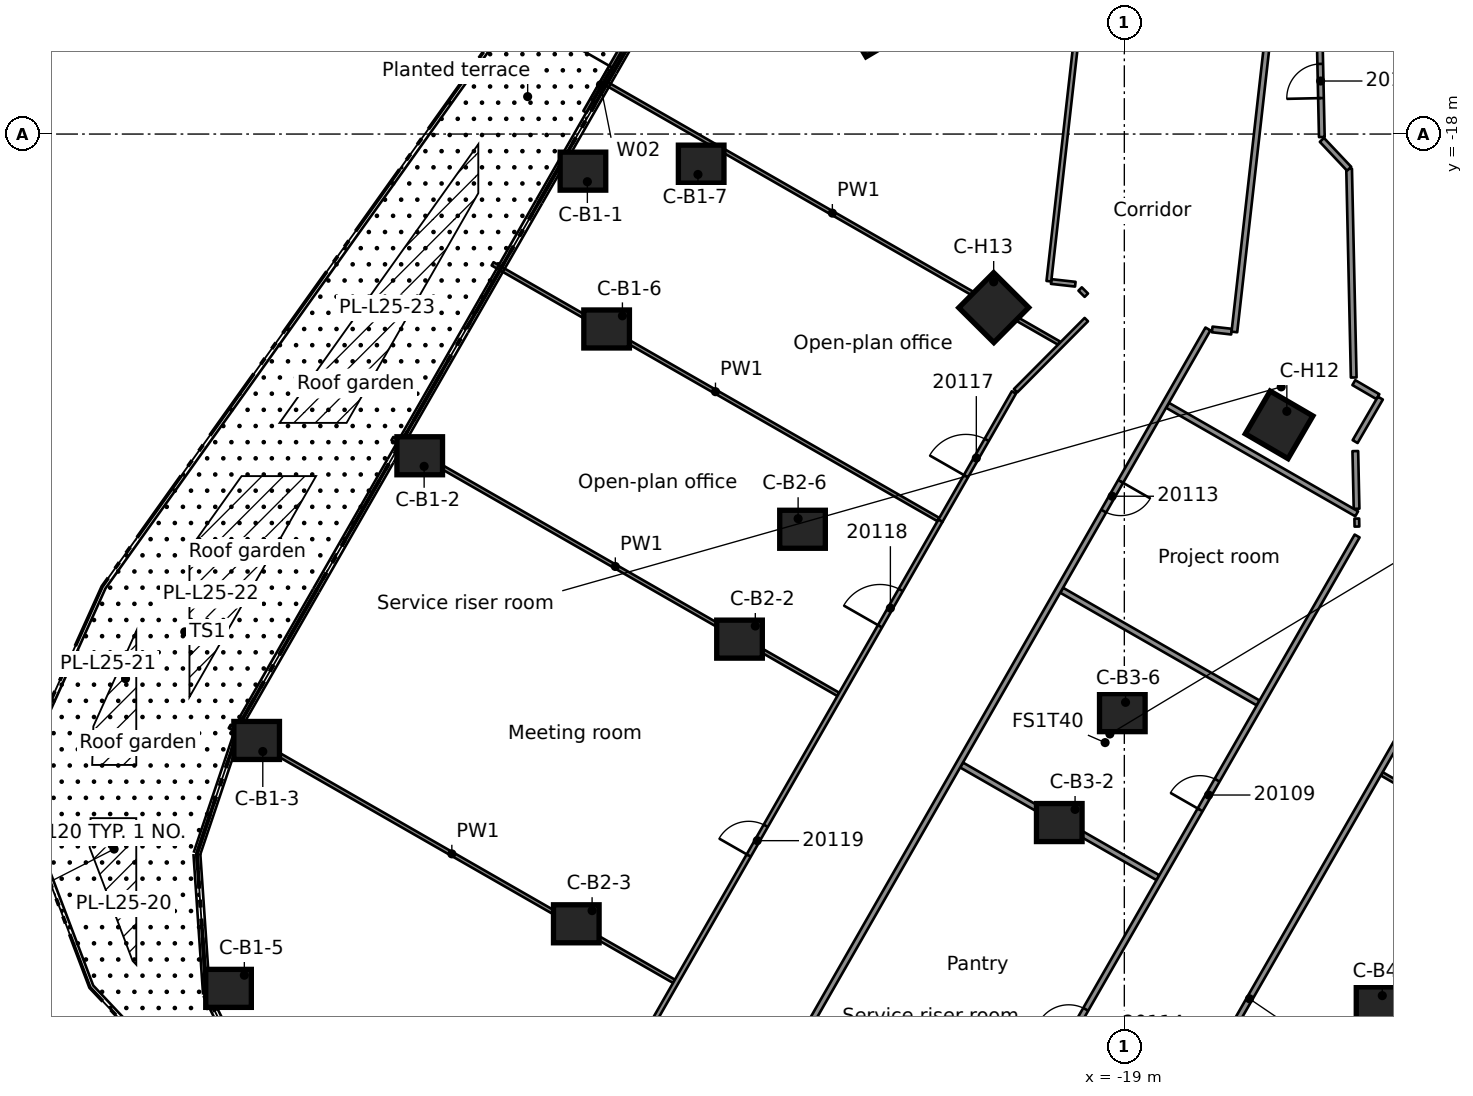
"""IFC4 building model, lengths in metres.
Left out: names, types, materials, properties, quantities, classifications, styles, units other than length and angle.
Written with IfcOpenShell. Run it as: python <this file> out.ifc"""

import sys

from ifc_helpers import new_model, si_unit, direction, frame, frame_2d, origin, origin_2d, place, context, subcontext, project, spatial, rectangle, extrude, element, fill, save


model = new_model("IFC4")
c1 = context("Model", 3, precision=1e-05, world=origin(), true_north=direction((0.0, 1.0)))
c2 = subcontext(c1, "Body", "Model", "MODEL_VIEW")
j1 = project(units=[si_unit("LENGTHUNIT", "METRE"), si_unit("PLANEANGLEUNIT", "RADIAN")], contexts=[c1])
p1 = place(None, origin())
s1 = spatial("IfcSite", under=j1, at=p1, CompositionType="ELEMENT")
p2 = place(p1, origin())
s2 = spatial("IfcBuilding", under=s1, at=p2, CompositionType="ELEMENT")
p3 = place(p2, frame((0.0, 0.0, 102.2)))
s3 = spatial("IfcBuildingStorey", under=s2, at=p3, CompositionType="ELEMENT", Elevation=102.2)
for number, where, z_axis, x_axis in (
    (1, (-33.246, -18.976, 0.0), (0.0, 0.0, 1.0), (1.0, 0.0, 0.0)),
    (2, (-37.541, -26.465, 0.0), (0.0, 0.0, 1.0), (1.0, 0.0, 0.0)),
    (3, (-41.832, -33.956, 0.0), (0.0, 0.0, 1.0), (1.0, 0.0, 0.0)),
    (4, (-42.572, -40.479, 0.0), (0.0, 0.0, 1.0), (1.0, 0.0, 0.0)),
    (5, (-32.623, -23.129, 0.0), (0.0, 0.0, 1.0), (1.0, 0.0, 0.0)),
    (6, (-30.135, -18.792, 0.0), (0.0, 0.0, 1.0), (1.0, 0.0, 0.0)),
    (7, (-29.126, -31.29, 0.0), (0.0, 0.0, 1.0), (1.0, 0.0, 0.0)),
    (8, (-33.421, -38.78, 0.0), (0.0, 0.0, 1.0), (1.0, 0.0, 0.0)),
    (9, (-27.468, -28.399, 0.0), (0.0, 0.0, 1.0), (1.0, 0.0, 0.0)),
    (10, (-20.712, -36.116, 0.0), (0.0, 0.0, 1.0), (1.0, 0.0, 0.0)),
    (11, (-19.053, -33.224, 0.0), (0.0, 0.0, 1.0), (1.0, 0.0, 0.0)),
    (12, (-12.297, -40.941, 0.0), (0.0, 0.0, 1.0), (1.0, 0.0, 0.0)),
):
    element("IfcColumn", number, at=place(p3, frame(where, z_axis=z_axis, x_axis=x_axis)), inside=s3, PredefinedType="COLUMN", context=c2, shape_type="SweptSolid", body=[
        extrude(rectangle(XDim=1.2, YDim=1.0, at=origin_2d()), origin(), (0.0, 0.0, 1.0), 3.5),
    ])
for number, where, z_axis, x_axis in (
    (13, (-14.927, -25.652, 0.0), (0.0, 0.0, 1.0), (-0.503, -0.864, 0.0)),
    (14, (-22.436, -22.567, 0.0), (0.0, 0.0, 1.0), (-0.705, -0.709, 0.0)),
    (15, (-25.565, -15.076, 0.0), (0.0, 0.0, 1.0), (-0.861, -0.508, 0.0)),
):
    element("IfcColumn", number, at=place(p3, frame(where, z_axis=z_axis, x_axis=x_axis)), inside=s3, PredefinedType="COLUMN", context=c2, shape_type="SweptSolid", body=[
        extrude(rectangle(XDim=1.3, YDim=1.3, at=origin_2d()), origin(), (0.0, 0.0, 1.0), 3.5),
    ])
p4 = place(p3, frame((-33.193, -17.416, 0.0), z_axis=(0.0, 0.0, 1.0), x_axis=(0.497482354019, 0.86747409612, 0.0)))
e16 = element("IfcWall", 16, at=p4, inside=s3, PredefinedType="STANDARD", context=c2, shape_type="SweptSolid", body=[
    extrude(rectangle(XDim=4.539, YDim=0.1, at=frame_2d((2.269, 0.0))), origin(), (0.0, 0.0, 1.0), 3.1),
])
p5 = place(p4, frame((1.369, 0.0, 0.0)))
e17 = element("IfcOpeningElement", 17, at=p5, cuts=e16, PredefinedType="OPENING", context=c2, shape_type="SweptSolid", body=[
    extrude(rectangle(XDim=1.8, YDim=2.4, at=frame_2d((0.9, 1.2))), frame((0.0, 0.06, 0.0), z_axis=(0.0, -1.0, 0.0), x_axis=(1.0, 0.0, 0.0)), (0.0, 0.0, 1.0), 0.12),
])
p6 = place(p4, frame((0.369, 0.0, 0.0)))
e18 = element("IfcOpeningElement", 18, at=p6, cuts=e16, PredefinedType="OPENING", context=c2, shape_type="SweptSolid", body=[
    extrude(rectangle(XDim=0.9, YDim=2.4, at=frame_2d((0.45, 1.2))), frame((0.0, 0.06, 0.0), z_axis=(0.0, -1.0, 0.0), x_axis=(1.0, 0.0, 0.0)), (0.0, 0.0, 1.0), 0.12),
])
p7 = place(p4, frame((3.269, 0.0, 0.0)))
e19 = element("IfcOpeningElement", 19, at=p7, cuts=e16, PredefinedType="OPENING", context=c2, shape_type="SweptSolid", body=[
    extrude(rectangle(XDim=0.9, YDim=2.4, at=frame_2d((0.45, 1.2))), frame((0.0, 0.06, 0.0), z_axis=(0.0, -1.0, 0.0), x_axis=(1.0, 0.0, 0.0)), (0.0, 0.0, 1.0), 0.12),
])
p8 = place(p3, frame((-12.922, -26.342, 0.0), z_axis=(0.0, 0.0, 1.0), x_axis=(0.021884343994, -0.999760509066, 0.0)))
e20 = element("IfcWall", 20, at=p8, inside=s3, PredefinedType="PARTITIONING", context=c2, shape_type="SweptSolid", body=[
    extrude(rectangle(XDim=1.517, YDim=0.15, at=frame_2d((0.759, 0.0))), origin(), (0.0, 0.0, 1.0), 3.08),
])
p9 = place(p3, frame((-13.803, -18.079, 0.0), z_axis=(0.0, 0.0, 1.0), x_axis=(-0.021654973705, 0.999765503563, 0.0)))
e21 = element("IfcWall", 21, at=p9, inside=s3, PredefinedType="PARTITIONING", context=c2, shape_type="SweptSolid", body=[
    extrude(rectangle(XDim=2.954, YDim=0.15, at=frame_2d((1.477, 0.0))), origin(), (0.0, 0.0, 1.0), 3.08),
])
p10 = place(p9, frame((1.025, 0.0, 0.0)))
e22 = element("IfcOpeningElement", 22, at=p10, cuts=e21, PredefinedType="OPENING", context=c2, shape_type="SweptSolid", body=[
    extrude(rectangle(XDim=0.9, YDim=2.1, at=frame_2d((0.45, 1.05))), frame((0.0, 0.085, 0.0), z_axis=(0.0, -1.0, 0.0), x_axis=(1.0, 0.0, 0.0)), (0.0, 0.0, 1.0), 0.17),
])
p11 = place(p3, frame((-13.085, -18.913, 0.0), z_axis=(0.0, 0.0, 1.0), x_axis=(0.021995655044, -0.999758066314, 0.0)))
e23 = element("IfcWall", 23, at=p11, inside=s3, PredefinedType="PARTITIONING", context=c2, shape_type="SweptSolid", body=[
    extrude(rectangle(XDim=5.494, YDim=0.15, at=frame_2d((2.747, 0.0))), origin(), (0.0, 0.0, 1.0), 3.08),
])
p12 = place(p3, frame((-12.883, -28.117, 0.0), z_axis=(0.0, 0.0, 1.0), x_axis=(0.019672118342, -0.999806485156, 0.0)))
e24 = element("IfcWall", 24, at=p12, inside=s3, PredefinedType="PARTITIONING", context=c2, shape_type="SweptSolid", body=[
    extrude(rectangle(XDim=0.211, YDim=0.125, at=frame_2d((0.105, 0.0))), origin(), (0.0, 0.0, 1.0), 3.08),
])
p13 = place(p3, frame((-20.163, -22.077, 0.0), z_axis=(0.0, 0.0, 1.0), x_axis=(0.707106781187, -0.707106781187, 0.0)))
e25 = element("IfcWall", 25, at=p13, inside=s3, PredefinedType="PARTITIONING", context=c2, shape_type="SweptSolid", body=[
    extrude(rectangle(XDim=0.231, YDim=0.125, at=frame_2d((0.115, 0.0))), origin(), (0.0, 0.0, 1.0), 3.08),
])
p14 = place(p3, frame((-12.961, -24.54, 0.0), z_axis=(0.0, 0.0, 1.0), x_axis=(0.863766837374, -0.503891705283, 0.0)))
e26 = element("IfcWall", 26, at=p14, inside=s3, PredefinedType="PARTITIONING", context=c2, shape_type="SweptSolid", body=[
    extrude(rectangle(XDim=0.734, YDim=0.15, at=frame_2d((0.367, 0.0))), origin(), (0.0, 0.0, 1.0), 3.08),
])
p15 = place(p3, frame((-42.542, -33.587, 0.0), z_axis=(0.0, 0.0, 1.0), x_axis=(0.867443920759, -0.497534967956, 0.0)))
e27 = element("IfcWall", 27, at=p15, inside=s3, PredefinedType="PARTITIONING", context=c2, shape_type="SweptSolid", body=[
    extrude(rectangle(XDim=13.479, YDim=0.1, at=frame_2d((6.739, 0.0))), origin(), (0.0, 0.0, 1.0), 3.08),
])
p16 = place(p3, frame((-38.261, -26.013, 0.0), z_axis=(0.0, 0.0, 1.0), x_axis=(0.867449007851, -0.49752609859, 0.0)))
e28 = element("IfcWall", 28, at=p16, inside=s3, PredefinedType="PARTITIONING", context=c2, shape_type="SweptSolid", body=[
    extrude(rectangle(XDim=13.527, YDim=0.1, at=frame_2d((6.763, 0.0))), origin(), (0.0, 0.0, 1.0), 3.08),
])
p17 = place(p3, frame((-23.283, -34.602, 0.0), z_axis=(0.0, 0.0, 1.0), x_axis=(0.867394604178, -0.497620940719, 0.0)))
e29 = element("IfcWall", 29, at=p17, inside=s3, PredefinedType="PARTITIONING", context=c2, shape_type="SweptSolid", body=[
    extrude(rectangle(XDim=5.958, YDim=0.15, at=frame_2d((2.979, 0.0))), origin(), (0.0, 0.0, 1.0), 3.08),
])
p18 = place(p3, frame((-35.624, -21.415, 0.0), z_axis=(0.0, 0.0, 1.0), x_axis=(0.867457713736, -0.497510919358, 0.0)))
e30 = element("IfcWall", 30, at=p18, inside=s3, PredefinedType="PARTITIONING", context=c2, shape_type="SweptSolid", body=[
    extrude(rectangle(XDim=13.523, YDim=0.1, at=frame_2d((6.762, 0.0))), origin(), (0.0, 0.0, 1.0), 3.08),
])
p19 = place(p3, frame((-20.65, -30.003, 0.0), z_axis=(0.0, 0.0, 1.0), x_axis=(0.867468461176, -0.497492179703, 0.0)))
e31 = element("IfcWall", 31, at=p19, inside=s3, PredefinedType="PARTITIONING", context=c2, shape_type="SweptSolid", body=[
    extrude(rectangle(XDim=5.962, YDim=0.15, at=frame_2d((2.981, 0.0))), origin(), (0.0, 0.0, 1.0), 3.08),
])
p20 = place(p3, frame((-12.225, -34.835, 0.0), z_axis=(0.0, 0.0, 1.0), x_axis=(0.867497921586, -0.497440806573, 0.0)))
e32 = element("IfcWall", 32, at=p20, inside=s3, PredefinedType="PARTITIONING", context=c2, shape_type="SweptSolid", body=[
    extrude(rectangle(XDim=13.525, YDim=0.1, at=frame_2d((6.763, 0.0))), origin(), (0.0, 0.0, 1.0), 3.08),
])
p21 = place(p3, frame((-32.645, -16.662, 0.0), z_axis=(0.0, 0.0, 1.0), x_axis=(0.867516428304, -0.497408530911, 0.0)))
e33 = element("IfcWall", 33, at=p21, inside=s3, PredefinedType="PARTITIONING", context=c2, shape_type="SweptSolid", body=[
    extrude(rectangle(XDim=13.745, YDim=0.1, at=frame_2d((6.873, 0.0))), origin(), (0.0, 0.0, 1.0), 3.08),
])
p22 = place(p3, frame((-17.864, -25.137, 0.0), z_axis=(0.0, 0.0, 1.0), x_axis=(0.867461886369, -0.497503643904, 0.0)))
e34 = element("IfcWall", 34, at=p22, inside=s3, PredefinedType="PARTITIONING", context=c2, shape_type="SweptSolid", body=[
    extrude(rectangle(XDim=5.739, YDim=0.15, at=frame_2d((2.869, 0.0))), origin(), (0.0, 0.0, 1.0), 3.08),
])
p23 = place(p3, frame((-16.687, -23.141, 0.0), z_axis=(0.0, 0.0, 1.0), x_axis=(0.993552701249, -0.113371203754, 0.0)))
e35 = element("IfcWall", 35, at=p23, inside=s3, PredefinedType="PARTITIONING", context=c2, shape_type="SweptSolid", body=[
    extrude(rectangle(XDim=0.51, YDim=0.15, at=frame_2d((0.255, 0.0))), origin(), (0.0, 0.0, 1.0), 3.08),
])
p24 = place(p3, frame((-20.924, -21.88, 0.0), z_axis=(0.0, 0.0, 1.0), x_axis=(0.993780638981, -0.111355473987, 0.0)))
e36 = element("IfcWall", 36, at=p24, inside=s3, PredefinedType="PARTITIONING", context=c2, shape_type="SweptSolid", body=[
    extrude(rectangle(XDim=0.638, YDim=0.125, at=frame_2d((0.319, 0.0))), origin(), (0.0, 0.0, 1.0), 3.08),
])
p25 = place(p3, frame((-13.801, -18.154, 0.0), z_axis=(0.0, 0.0, 1.0), x_axis=(0.686218091213, -0.727395855977, 0.0)))
e37 = element("IfcWall", 37, at=p25, inside=s3, PredefinedType="PARTITIONING", context=c2, shape_type="SweptSolid", body=[
    extrude(rectangle(XDim=1.043, YDim=0.15, at=frame_2d((0.522, 0.0))), origin(), (0.0, 0.0, 1.0), 3.08),
])
p26 = place(p3, frame((-20.0, -22.882, 0.0), z_axis=(0.0, 0.0, 1.0), x_axis=(-0.705070089301, -0.709137623578, 0.0)))
e38 = element("IfcWall", 38, at=p26, inside=s3, PredefinedType="PARTITIONING", context=c2, shape_type="SweptSolid", body=[
    extrude(rectangle(XDim=2.641, YDim=0.125, at=frame_2d((1.32, 0.0))), origin(), (0.0, 0.0, 1.0), 3.08),
])
p27 = place(p3, frame((-12.927, -26.092, 0.0), z_axis=(0.0, 0.0, 1.0), x_axis=(0.502562736504, 0.864540742752, 0.0)))
e39 = element("IfcWall", 39, at=p27, inside=s3, PredefinedType="PARTITIONING", context=c2, shape_type="SweptSolid", body=[
    extrude(rectangle(XDim=1.323, YDim=0.15, at=frame_2d((0.662, 0.0))), origin(), (0.0, 0.0, 1.0), 3.08),
])
p28 = place(p3, frame((-9.673, -30.229, 0.0), z_axis=(0.0, 0.0, 1.0), x_axis=(-0.497332712809, -0.867559895783, 0.0)))
e40 = element("IfcWall", 40, at=p28, inside=s3, PredefinedType="PARTITIONING", context=c2, shape_type="SweptSolid", body=[
    extrude(rectangle(XDim=24.261, YDim=0.15, at=frame_2d((12.131, 0.0))), origin(), (0.0, 0.0, 1.0), 3.08),
])
p29 = place(p28, frame((1.288, 0.0, 0.0)))
e41 = element("IfcOpeningElement", 41, at=p29, cuts=e40, PredefinedType="OPENING", context=c2, shape_type="SweptSolid", body=[
    extrude(rectangle(XDim=1.1, YDim=2.1, at=frame_2d((0.55, 1.05))), frame((0.0, 0.085, 0.0), z_axis=(0.0, -1.0, 0.0), x_axis=(1.0, 0.0, 0.0)), (0.0, 0.0, 1.0), 0.17),
])
p30 = place(p28, frame((14.415, 0.0, 0.0)))
e42 = element("IfcOpeningElement", 42, at=p30, cuts=e40, PredefinedType="OPENING", context=c2, shape_type="SweptSolid", body=[
    extrude(rectangle(XDim=0.9, YDim=2.1, at=frame_2d((0.45, 1.05))), frame((0.0, 0.085, 0.0), z_axis=(0.0, -1.0, 0.0), x_axis=(1.0, 0.0, 0.0)), (0.0, 0.0, 1.0), 0.17),
])
p31 = place(p3, frame((-23.323, -46.799, 0.0), z_axis=(0.0, 0.0, 1.0), x_axis=(0.497421315986, 0.867509097591, 0.0)))
e43 = element("IfcWall", 43, at=p31, inside=s3, PredefinedType="PARTITIONING", context=c2, shape_type="SweptSolid", body=[
    extrude(rectangle(XDim=21.006, YDim=0.15, at=frame_2d((10.503, 0.0))), origin(), (0.0, 0.0, 1.0), 3.08),
])
p32 = place(p31, frame((12.7, 0.0, 0.0)))
e44 = element("IfcOpeningElement", 44, at=p32, cuts=e43, PredefinedType="OPENING", context=c2, shape_type="SweptSolid", body=[
    extrude(rectangle(XDim=0.9, YDim=2.1, at=frame_2d((0.45, 1.05))), frame((0.0, 0.085, 0.0), z_axis=(0.0, -1.0, 0.0), x_axis=(1.0, 0.0, 0.0)), (0.0, 0.0, 1.0), 0.17),
])
p33 = place(p31, frame((5.75, 0.0, 0.0)))
e45 = element("IfcOpeningElement", 45, at=p33, cuts=e43, PredefinedType="OPENING", context=c2, shape_type="SweptSolid", body=[
    extrude(rectangle(XDim=0.9, YDim=2.1, at=frame_2d((0.45, 1.05))), frame((0.0, 0.085, 0.0), z_axis=(0.0, -1.0, 0.0), x_axis=(1.0, 0.0, 0.0)), (0.0, 0.0, 1.0), 0.17),
])
p34 = place(p3, frame((-16.8, -23.128, 0.0), z_axis=(0.0, 0.0, 1.0), x_axis=(-0.496846554385, -0.867838407422, 0.0)))
e46 = element("IfcWall", 46, at=p34, inside=s3, PredefinedType="PARTITIONING", context=c2, shape_type="SweptSolid", body=[
    extrude(rectangle(XDim=21.88, YDim=0.15, at=frame_2d((10.94, 0.0))), origin(), (0.0, 0.0, 1.0), 3.08),
])
p35 = place(p34, frame((4.622, 0.0, 0.0)))
e47 = element("IfcOpeningElement", 47, at=p35, cuts=e46, PredefinedType="OPENING", context=c2, shape_type="SweptSolid", body=[
    extrude(rectangle(XDim=0.9, YDim=2.1, at=frame_2d((0.45, 1.05))), frame((0.0, 0.085, 0.0), z_axis=(0.0, -1.0, 0.0), x_axis=(1.0, 0.0, 0.0)), (0.0, 0.0, 1.0), 0.17),
])
p36 = place(p3, frame((-23.839, -28.174, 0.0), z_axis=(0.0, 0.0, 1.0), x_axis=(0.49701747238, 0.867740532734, 0.0)))
e48 = element("IfcWall", 48, at=p36, inside=s3, PredefinedType="PARTITIONING", context=c2, shape_type="SweptSolid", body=[
    extrude(rectangle(XDim=3.889, YDim=0.125, at=frame_2d((1.945, 0.0))), origin(), (0.0, 0.0, 1.0), 3.08),
])
p37 = place(p36, frame((1.35, 0.0, 0.0)))
e49 = element("IfcOpeningElement", 49, at=p37, cuts=e48, PredefinedType="OPENING", context=c2, shape_type="SweptSolid", body=[
    extrude(rectangle(XDim=1.1, YDim=2.1, at=frame_2d((0.55, 1.05))), frame((0.0, 0.073, 0.0), z_axis=(0.0, -1.0, 0.0), x_axis=(1.0, 0.0, 0.0)), (0.0, 0.0, 1.0), 0.145),
])
p38 = place(p3, frame((-33.38, -44.837, 0.0), z_axis=(0.0, 0.0, 1.0), x_axis=(0.496890503853, 0.867813244414, 0.0)))
e50 = element("IfcWall", 50, at=p38, inside=s3, PredefinedType="PARTITIONING", context=c2, shape_type="SweptSolid", body=[
    extrude(rectangle(XDim=19.201, YDim=0.125, at=frame_2d((9.601, 0.0))), origin(), (0.0, 0.0, 1.0), 3.08),
])
p39 = place(p38, frame((16.0, 0.0, 0.0)))
e51 = element("IfcOpeningElement", 51, at=p39, cuts=e50, PredefinedType="OPENING", context=c2, shape_type="SweptSolid", body=[
    extrude(rectangle(XDim=1.1, YDim=2.1, at=frame_2d((0.55, 1.05))), frame((0.0, 0.073, 0.0), z_axis=(0.0, -1.0, 0.0), x_axis=(1.0, 0.0, 0.0)), (0.0, 0.0, 1.0), 0.145),
])
p40 = place(p38, frame((9.05, 0.0, 0.0)))
e52 = element("IfcOpeningElement", 52, at=p40, cuts=e50, PredefinedType="OPENING", context=c2, shape_type="SweptSolid", body=[
    extrude(rectangle(XDim=0.9, YDim=2.1, at=frame_2d((0.45, 1.05))), frame((0.0, 0.073, 0.0), z_axis=(0.0, -1.0, 0.0), x_axis=(1.0, 0.0, 0.0)), (0.0, 0.0, 1.0), 0.145),
])
p41 = place(p3, frame((-16.104, -23.207, 0.0), z_axis=(0.0, 0.0, 1.0), x_axis=(0.112384250222, 0.993664822917, 0.0)))
e53 = element("IfcWall", 53, at=p41, inside=s3, PredefinedType="PARTITIONING", context=c2, shape_type="SweptSolid", body=[
    extrude(rectangle(XDim=8.205, YDim=0.15, at=frame_2d((4.103, 0.0))), origin(), (0.0, 0.0, 1.0), 3.08),
])
p42 = place(p3, frame((-20.986, -21.872, 0.0), z_axis=(0.0, 0.0, 1.0), x_axis=(0.112457212795, 0.993656568081, 0.0)))
e54 = element("IfcWall", 54, at=p42, inside=s3, PredefinedType="PARTITIONING", context=c2, shape_type="SweptSolid", body=[
    extrude(rectangle(XDim=6.865, YDim=0.125, at=frame_2d((3.432, 0.0))), origin(), (0.0, 0.0, 1.0), 3.08),
])
p43 = place(p5, origin())
e55 = element("IfcDoor", 55, at=p43, inside=s3, OperationType="DOUBLE_DOOR_SINGLE_SWING", PredefinedType="DOOR", context=c2, shape_type="SweptSolid", body=[
    extrude(rectangle(XDim=1.8, YDim=2.4, at=frame_2d((0.9, 1.2))), frame((0.0, 0.025, 0.0), z_axis=(0.0, -1.0, 0.0), x_axis=(1.0, 0.0, 0.0)), (0.0, 0.0, 1.0), 0.05),
])
fill(e17, e55)
p44 = place(p6, origin())
e56 = element("IfcWindow", 56, at=p44, inside=s3, PartitioningType="SINGLE_PANEL", PredefinedType="WINDOW", context=c2, shape_type="SweptSolid", body=[
    extrude(rectangle(XDim=0.9, YDim=2.4, at=frame_2d((0.45, 1.2))), frame((0.0, 0.03, 0.0), z_axis=(0.0, -1.0, 0.0), x_axis=(1.0, 0.0, 0.0)), (0.0, 0.0, 1.0), 0.06),
])
fill(e18, e56)
p45 = place(p32, origin())
e57 = element("IfcDoor", 57, at=p45, inside=s3, OperationType="SINGLE_SWING_RIGHT", PredefinedType="DOOR", context=c2, shape_type="SweptSolid", body=[
    extrude(rectangle(XDim=0.9, YDim=2.1, at=frame_2d((0.45, 1.05))), frame((0.0, 0.025, 0.0), z_axis=(0.0, -1.0, 0.0), x_axis=(1.0, 0.0, 0.0)), (0.0, 0.0, 1.0), 0.05),
])
fill(e44, e57)
p46 = place(p35, origin())
e58 = element("IfcDoor", 58, at=p46, inside=s3, OperationType="SINGLE_SWING_LEFT", PredefinedType="DOOR", context=c2, shape_type="SweptSolid", body=[
    extrude(rectangle(XDim=0.9, YDim=2.1, at=frame_2d((0.45, 1.05))), frame((0.0, 0.025, 0.0), z_axis=(0.0, -1.0, 0.0), x_axis=(1.0, 0.0, 0.0)), (0.0, 0.0, 1.0), 0.05),
])
fill(e47, e58)
p47 = place(p33, origin())
e59 = element("IfcDoor", 59, at=p47, inside=s3, OperationType="SINGLE_SWING_LEFT", PredefinedType="DOOR", context=c2, shape_type="SweptSolid", body=[
    extrude(rectangle(XDim=0.9, YDim=2.1, at=frame_2d((0.45, 1.05))), frame((0.0, 0.025, 0.0), z_axis=(0.0, -1.0, 0.0), x_axis=(1.0, 0.0, 0.0)), (0.0, 0.0, 1.0), 0.05),
])
fill(e45, e59)
p48 = place(p37, origin())
e60 = element("IfcDoor", 60, at=p48, inside=s3, OperationType="SINGLE_SWING_LEFT", PredefinedType="DOOR", context=c2, shape_type="SweptSolid", body=[
    extrude(rectangle(XDim=1.1, YDim=2.1, at=frame_2d((0.55, 1.05))), frame((0.0, 0.025, 0.0), z_axis=(0.0, -1.0, 0.0), x_axis=(1.0, 0.0, 0.0)), (0.0, 0.0, 1.0), 0.05),
])
fill(e49, e60)
p49 = place(p39, origin())
e61 = element("IfcDoor", 61, at=p49, inside=s3, OperationType="SINGLE_SWING_RIGHT", PredefinedType="DOOR", context=c2, shape_type="SweptSolid", body=[
    extrude(rectangle(XDim=1.1, YDim=2.1, at=frame_2d((0.55, 1.05))), frame((0.0, 0.025, 0.0), z_axis=(0.0, -1.0, 0.0), x_axis=(1.0, 0.0, 0.0)), (0.0, 0.0, 1.0), 0.05),
])
fill(e51, e61)
p50 = place(p40, origin())
e62 = element("IfcDoor", 62, at=p50, inside=s3, OperationType="SINGLE_SWING_LEFT", PredefinedType="DOOR", context=c2, shape_type="SweptSolid", body=[
    extrude(rectangle(XDim=0.9, YDim=2.1, at=frame_2d((0.45, 1.05))), frame((0.0, 0.025, 0.0), z_axis=(0.0, -1.0, 0.0), x_axis=(1.0, 0.0, 0.0)), (0.0, 0.0, 1.0), 0.05),
])
fill(e52, e62)
p51 = place(p10, origin())
e63 = element("IfcDoor", 63, at=p51, inside=s3, OperationType="SINGLE_SWING_LEFT", PredefinedType="DOOR", context=c2, shape_type="SweptSolid", body=[
    extrude(rectangle(XDim=0.9, YDim=2.1, at=frame_2d((0.45, 1.05))), frame((0.0, 0.025, 0.0), z_axis=(0.0, -1.0, 0.0), x_axis=(1.0, 0.0, 0.0)), (0.0, 0.0, 1.0), 0.05),
])
fill(e22, e63)
save(model, sys.argv[1])
